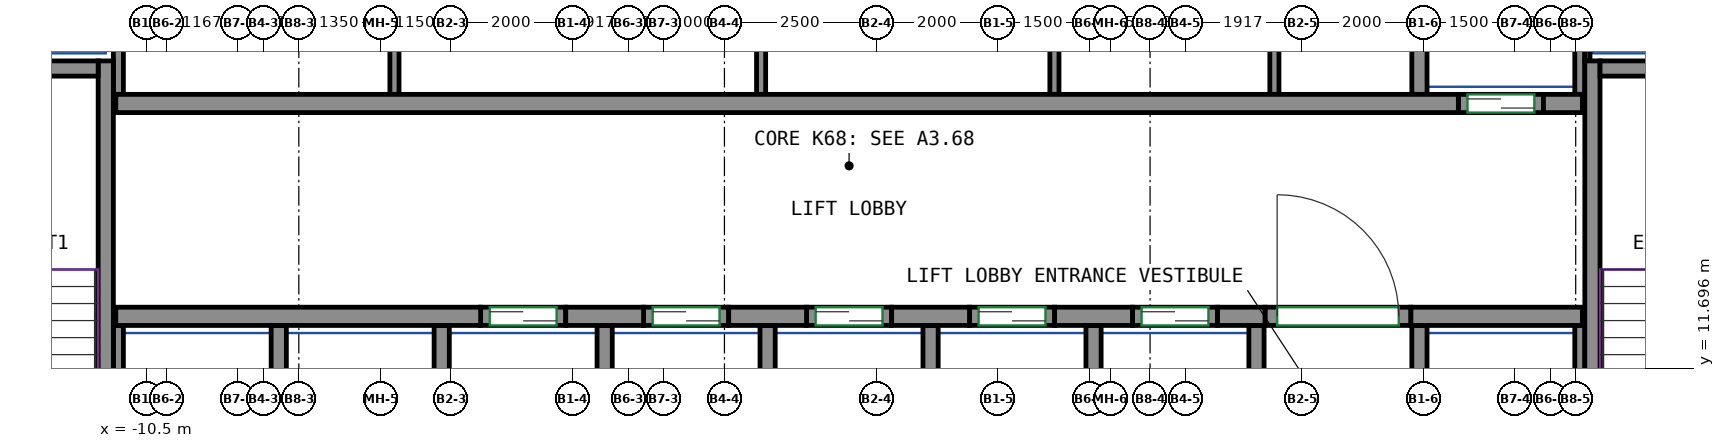
"""IFC4 building model, lengths in metres.
Left out: names, types, materials, properties, quantities, classifications, styles, units other than length and angle.
Written with IfcOpenShell. Run it as: python <this file> out.ifc"""

import sys

from ifc_helpers import new_model, si_unit, direction, frame, frame_2d, origin, place, context, subcontext, project, spatial, rectangle, extrude, source, transform, mapped, element, fill, save


model = new_model("IFC4")
c1 = context("Model", 3, precision=1e-05, world=origin(), true_north=direction((0.0, 1.0)))
c2 = subcontext(c1, "Body", "Model", "MODEL_VIEW")
j1 = project(units=[si_unit("LENGTHUNIT", "METRE"), si_unit("PLANEANGLEUNIT", "RADIAN")], contexts=[c1])
p1 = place(None, origin())
s1 = spatial("IfcSite", under=j1, at=p1, CompositionType="ELEMENT")
p2 = place(p1, origin())
s2 = spatial("IfcBuilding", under=s1, at=p2, CompositionType="ELEMENT")
p3 = place(p2, frame((0.0, 0.0, 273.8)))
s3 = spatial("IfcBuildingStorey", under=s2, at=p3, CompositionType="ELEMENT", Elevation=273.8)
m1 = source(origin(), c2, "Body", "SweptSolid", [
    extrude(rectangle(XDim=7.75, YDim=0.25, at=frame_2d((3.875, 0.0))), origin(), (0.0, 0.0, 1.0), 3.12),
])
p4 = place(p3, frame((-11.175, 9.0, 0.0), z_axis=(0.0, 0.0, 1.0), x_axis=(0.0, 1.0, 0.0)))
e1 = element("IfcWall", 1, at=p4, inside=s3, PredefinedType="SHEAR", context=c2, shape_type="MappedRepresentation", body=[
    mapped(m1, transform((0.0, 0.0, 0.0))),
])
m2 = source(origin(), c2, "Body", "SweptSolid", [
    extrude(rectangle(XDim=3.7, YDim=0.25, at=frame_2d((1.85, 0.0))), origin(), (0.0, 0.0, 1.0), 3.12),
])
p5 = place(p3, frame((-15.0, 16.625, 0.0), z_axis=(0.0, 0.0, 1.0), x_axis=(1.0, 0.0, 0.0)))
e2 = element("IfcWall", 2, at=p5, inside=s3, PredefinedType="SHEAR", context=c2, shape_type="MappedRepresentation", body=[
    mapped(m2, transform((0.0, 0.0, 0.0))),
])
p6 = place(p3, frame((13.275, 9.0, 0.0), z_axis=(0.0, 0.0, 1.0), x_axis=(0.0, 1.0, 0.0)))
e3 = element("IfcWall", 3, at=p6, inside=s3, PredefinedType="SHEAR", context=c2, shape_type="MappedRepresentation", body=[
    mapped(m1, transform((0.0, 0.0, 0.0))),
])
m3 = source(origin(), c2, "Body", "SweptSolid", [
    extrude(rectangle(XDim=3.7, YDim=0.25, at=frame_2d((1.85, 0.0))), origin(), (0.0, 0.0, 1.0), 3.12),
])
p7 = place(p3, frame((13.4, 16.625, 0.0), z_axis=(0.0, 0.0, 1.0), x_axis=(1.0, 0.0, 0.0)))
e4 = element("IfcWall", 4, at=p7, inside=s3, PredefinedType="SHEAR", context=c2, shape_type="MappedRepresentation", body=[
    mapped(m3, transform((0.0, 0.0, 0.0))),
])
m4 = source(origin(), c2, "Body", "SweptSolid", [
    extrude(rectangle(XDim=6.0, YDim=0.3, at=frame_2d((3.0, 0.0))), origin(), (0.0, 0.0, 1.0), 3.12),
])
p8 = place(p3, frame((-11.01, 12.55, 0.0), z_axis=(0.0, 0.0, 1.0), x_axis=(1.0, 0.0, 0.0)))
e5 = element("IfcWall", 5, at=p8, inside=s3, PredefinedType="SHEAR", context=c2, shape_type="MappedRepresentation", body=[
    mapped(m4, transform((0.0, 0.0, 0.0))),
])
m5 = source(origin(), c2, "Body", "SweptSolid", [
    extrude(rectangle(XDim=1.28, YDim=0.3, at=frame_2d((0.64, 0.0))), origin(), (0.0, 0.0, 1.0), 3.12),
])
for number, where, z_axis, x_axis in (
    (6, (-3.61, 12.55, 0.0), (0.0, 0.0, 1.0), (1.0, 0.0, 0.0)),
    (7, (-0.93, 12.55, 0.0), (0.0, 0.0, 1.0), (1.0, 0.0, 0.0)),
    (8, (1.75, 12.55, 0.0), (0.0, 0.0, 1.0), (1.0, 0.0, 0.0)),
    (9, (4.43, 12.55, 0.0), (0.0, 0.0, 1.0), (1.0, 0.0, 0.0)),
):
    element("IfcWall", number, at=place(p3, frame(where, z_axis=z_axis, x_axis=x_axis)), inside=s3, PredefinedType="SHEAR", context=c2, shape_type="MappedRepresentation", body=[
        mapped(m5, transform((0.0, 0.0, 0.0))),
    ])
m6 = source(origin(), c2, "Body", "SweptSolid", [
    extrude(rectangle(XDim=0.78, YDim=0.3, at=frame_2d((0.39, 0.0))), origin(), (0.0, 0.0, 1.0), 3.12),
])
p9 = place(p3, frame((7.11, 12.55, 0.0), z_axis=(0.0, 0.0, 1.0), x_axis=(1.0, 0.0, 0.0)))
e10 = element("IfcWall", 10, at=p9, inside=s3, PredefinedType="SHEAR", context=c2, shape_type="MappedRepresentation", body=[
    mapped(m6, transform((0.0, 0.0, 0.0))),
])
m7 = source(origin(), c2, "Body", "SweptSolid", [
    extrude(rectangle(XDim=2.82, YDim=0.3, at=frame_2d((1.41, 0.0))), origin(), (0.0, 0.0, 1.0), 3.12),
])
p10 = place(p3, frame((10.29, 12.55, 0.0), z_axis=(0.0, 0.0, 1.0), x_axis=(1.0, 0.0, 0.0)))
e11 = element("IfcWall", 11, at=p10, inside=s3, PredefinedType="SHEAR", context=c2, shape_type="MappedRepresentation", body=[
    mapped(m7, transform((0.0, 0.0, 0.0))),
])
m8 = source(origin(), c2, "Body", "SweptSolid", [
    extrude(rectangle(XDim=22.08, YDim=0.3, at=frame_2d((11.04, 0.0))), origin(), (0.0, 0.0, 1.0), 3.12),
])
p11 = place(p3, frame((-11.01, 16.05, 0.0), z_axis=(0.0, 0.0, 1.0), x_axis=(1.0, 0.0, 0.0)))
e12 = element("IfcWall", 12, at=p11, inside=s3, PredefinedType="SHEAR", context=c2, shape_type="MappedRepresentation", body=[
    mapped(m8, transform((0.0, 0.0, 0.0))),
])
m9 = source(origin(), c2, "Body", "SweptSolid", [
    extrude(rectangle(XDim=0.64, YDim=0.3, at=frame_2d((0.32, 0.0))), origin(), (0.0, 0.0, 1.0), 3.12),
])
p12 = place(p3, frame((12.47, 16.05, 0.0), z_axis=(0.0, 0.0, 1.0), x_axis=(1.0, 0.0, 0.0)))
e13 = element("IfcWall", 13, at=p12, inside=s3, PredefinedType="SHEAR", context=c2, shape_type="MappedRepresentation", body=[
    mapped(m9, transform((0.0, 0.0, 0.0))),
])
m10 = source(origin(), c2, "Body", "SweptSolid", [
    extrude(rectangle(XDim=1.4, YDim=0.3, at=frame_2d((0.7, 0.0))), origin(), (0.0, 0.0, 1.0), 3.12),
])
p13 = place(p3, frame((-5.01, 12.55, 0.0), z_axis=(0.0, 0.0, 1.0), x_axis=(1.0, 0.0, 0.0)))
e14 = element("IfcWall", 14, at=p13, inside=s3, PredefinedType="PARTITIONING", context=c2, shape_type="MappedRepresentation", body=[
    mapped(m10, transform((0.0, 0.0, 0.0))),
])
p14 = place(p13, frame((0.15, 0.0, 0.0)))
e15 = element("IfcOpeningElement", 15, at=p14, cuts=e14, PredefinedType="OPENING", context=c2, shape_type="SweptSolid", body=[
    extrude(rectangle(XDim=1.1, YDim=2.1, at=frame_2d((0.55, 1.05))), frame((0.0, 0.16, 0.0), z_axis=(0.0, -1.0, 0.0), x_axis=(1.0, 0.0, 0.0)), (0.0, 0.0, 1.0), 0.32),
])
m11 = source(origin(), c2, "Body", "SweptSolid", [
    extrude(rectangle(XDim=1.4, YDim=0.3, at=frame_2d((0.7, 0.0))), origin(), (0.0, 0.0, 1.0), 3.12),
])
p15 = place(p3, frame((-2.33, 12.55, 0.0), z_axis=(0.0, 0.0, 1.0), x_axis=(1.0, 0.0, 0.0)))
e16 = element("IfcWall", 16, at=p15, inside=s3, PredefinedType="PARTITIONING", context=c2, shape_type="MappedRepresentation", body=[
    mapped(m11, transform((0.0, 0.0, 0.0))),
])
p16 = place(p15, frame((0.15, 0.0, 0.0)))
e17 = element("IfcOpeningElement", 17, at=p16, cuts=e16, PredefinedType="OPENING", context=c2, shape_type="SweptSolid", body=[
    extrude(rectangle(XDim=1.1, YDim=2.1, at=frame_2d((0.55, 1.05))), frame((0.0, 0.16, 0.0), z_axis=(0.0, -1.0, 0.0), x_axis=(1.0, 0.0, 0.0)), (0.0, 0.0, 1.0), 0.32),
])
p17 = place(p3, frame((0.35, 12.55, 0.0), z_axis=(0.0, 0.0, 1.0), x_axis=(1.0, 0.0, 0.0)))
e18 = element("IfcWall", 18, at=p17, inside=s3, PredefinedType="PARTITIONING", context=c2, shape_type="MappedRepresentation", body=[
    mapped(m10, transform((0.0, 0.0, 0.0))),
])
p18 = place(p17, frame((0.15, 0.0, 0.0)))
e19 = element("IfcOpeningElement", 19, at=p18, cuts=e18, PredefinedType="OPENING", context=c2, shape_type="SweptSolid", body=[
    extrude(rectangle(XDim=1.1, YDim=2.1, at=frame_2d((0.55, 1.05))), frame((0.0, 0.16, 0.0), z_axis=(0.0, -1.0, 0.0), x_axis=(1.0, 0.0, 0.0)), (0.0, 0.0, 1.0), 0.32),
])
p19 = place(p3, frame((3.03, 12.55, 0.0), z_axis=(0.0, 0.0, 1.0), x_axis=(1.0, 0.0, 0.0)))
e20 = element("IfcWall", 20, at=p19, inside=s3, PredefinedType="PARTITIONING", context=c2, shape_type="MappedRepresentation", body=[
    mapped(m10, transform((0.0, 0.0, 0.0))),
])
p20 = place(p19, frame((0.15, 0.0, 0.0)))
e21 = element("IfcOpeningElement", 21, at=p20, cuts=e20, PredefinedType="OPENING", context=c2, shape_type="SweptSolid", body=[
    extrude(rectangle(XDim=1.1, YDim=2.1, at=frame_2d((0.55, 1.05))), frame((0.0, 0.16, 0.0), z_axis=(0.0, -1.0, 0.0), x_axis=(1.0, 0.0, 0.0)), (0.0, 0.0, 1.0), 0.32),
])
p21 = place(p3, frame((5.71, 12.55, 0.0), z_axis=(0.0, 0.0, 1.0), x_axis=(1.0, 0.0, 0.0)))
e22 = element("IfcWall", 22, at=p21, inside=s3, PredefinedType="PARTITIONING", context=c2, shape_type="MappedRepresentation", body=[
    mapped(m11, transform((0.0, 0.0, 0.0))),
])
p22 = place(p21, frame((0.15, 0.0, 0.0)))
e23 = element("IfcOpeningElement", 23, at=p22, cuts=e22, PredefinedType="OPENING", context=c2, shape_type="SweptSolid", body=[
    extrude(rectangle(XDim=1.1, YDim=2.1, at=frame_2d((0.55, 1.05))), frame((0.0, 0.16, 0.0), z_axis=(0.0, -1.0, 0.0), x_axis=(1.0, 0.0, 0.0)), (0.0, 0.0, 1.0), 0.32),
])
p23 = place(p3, frame((11.07, 16.05, 0.0), z_axis=(0.0, 0.0, 1.0), x_axis=(1.0, 0.0, 0.0)))
e24 = element("IfcWall", 24, at=p23, inside=s3, PredefinedType="PARTITIONING", context=c2, shape_type="MappedRepresentation", body=[
    mapped(m10, transform((0.0, 0.0, 0.0))),
])
p24 = place(p23, frame((0.15, 0.0, 0.0)))
e25 = element("IfcOpeningElement", 25, at=p24, cuts=e24, PredefinedType="OPENING", context=c2, shape_type="SweptSolid", body=[
    extrude(rectangle(XDim=1.1, YDim=2.1, at=frame_2d((0.55, 1.05))), frame((0.0, 0.16, 0.0), z_axis=(0.0, -1.0, 0.0), x_axis=(1.0, 0.0, 0.0)), (0.0, 0.0, 1.0), 0.32),
])
m12 = source(origin(), c2, "Body", "SweptSolid", [
    extrude(rectangle(XDim=2.4, YDim=0.3, at=frame_2d((1.2, 0.0))), origin(), (0.0, 0.0, 1.0), 3.12),
])
p25 = place(p3, frame((7.89, 12.55, 0.0), z_axis=(0.0, 0.0, 1.0), x_axis=(1.0, 0.0, 0.0)))
e26 = element("IfcWall", 26, at=p25, inside=s3, PredefinedType="PARTITIONING", context=c2, shape_type="MappedRepresentation", body=[
    mapped(m12, transform((0.0, 0.0, 0.0))),
])
p26 = place(p25, frame((0.2, 0.0, 0.0)))
e27 = element("IfcOpeningElement", 27, at=p26, cuts=e26, PredefinedType="OPENING", context=c2, shape_type="SweptSolid", body=[
    extrude(rectangle(XDim=2.0, YDim=2.1, at=frame_2d((1.0, 1.05))), frame((0.0, 0.16, 0.0), z_axis=(0.0, -1.0, 0.0), x_axis=(1.0, 0.0, 0.0)), (0.0, 0.0, 1.0), 0.32),
])
m13 = source(origin(), c2, "Body", "SweptSolid", [
    extrude(rectangle(XDim=3.275, YDim=0.165, at=frame_2d((1.638, 0.0))), origin(), (0.0, 0.0, 1.0), 3.12),
])
p27 = place(p3, frame((13.067, 16.2, 0.0), z_axis=(0.0, 0.0, 1.0), x_axis=(0.0, 1.0, 0.0)))
e28 = element("IfcWall", 28, at=p27, inside=s3, PredefinedType="PARTITIONING", context=c2, shape_type="MappedRepresentation", body=[
    mapped(m13, transform((0.0, 0.0, 0.0))),
])
m14 = source(origin(), c2, "Body", "SweptSolid", [
    extrude(rectangle(XDim=4.8, YDim=0.165, at=frame_2d((2.4, 0.0))), origin(), (0.0, 0.0, 1.0), 3.12),
])
p28 = place(p3, frame((-10.968, 16.2, 0.0), z_axis=(0.0, 0.0, 1.0), x_axis=(0.0, 1.0, 0.0)))
e29 = element("IfcWall", 29, at=p28, inside=s3, PredefinedType="PARTITIONING", context=c2, shape_type="MappedRepresentation", body=[
    mapped(m14, transform((0.0, 0.0, 0.0))),
])
m15 = source(origin(), c2, "Body", "SweptSolid", [
    extrude(rectangle(XDim=3.275, YDim=0.25, at=frame_2d((1.638, 0.0))), origin(), (0.0, 0.0, 1.0), 3.12),
])
p29 = place(p3, frame((10.43, 16.2, 0.0), z_axis=(0.0, 0.0, 1.0), x_axis=(0.0, 1.0, 0.0)))
e30 = element("IfcWall", 30, at=p29, inside=s3, PredefinedType="PARTITIONING", context=c2, shape_type="MappedRepresentation", body=[
    mapped(m15, transform((0.0, 0.0, 0.0))),
])
m16 = source(origin(), c2, "Body", "SweptSolid", [
    extrude(rectangle(XDim=2.725, YDim=0.085, at=frame_2d((1.363, 0.0))), origin(), (0.0, 0.0, 1.0), 3.12),
])
p30 = place(p3, frame((13.192, 16.75, 0.0), z_axis=(0.0, 0.0, 1.0), x_axis=(0.0, 1.0, 0.0)))
e31 = element("IfcWall", 31, at=p30, inside=s3, PredefinedType="PARTITIONING", context=c2, shape_type="MappedRepresentation", body=[
    mapped(m16, transform((0.0, 0.0, 0.0))),
])
m17 = source(origin(), c2, "Body", "SweptSolid", [
    extrude(rectangle(XDim=3.4, YDim=0.25, at=frame_2d((1.7, 0.0))), origin(), (0.0, 0.0, 1.0), 3.12),
])
p31 = place(p3, frame((10.43, 9.0, 0.0), z_axis=(0.0, 0.0, 1.0), x_axis=(0.0, 1.0, 0.0)))
e32 = element("IfcWall", 32, at=p31, inside=s3, PredefinedType="PARTITIONING", context=c2, shape_type="MappedRepresentation", body=[
    mapped(m17, transform((0.0, 0.0, 0.0))),
])
m18 = source(origin(), c2, "Body", "SweptSolid", [
    extrude(rectangle(XDim=3.4, YDim=0.165, at=frame_2d((1.7, 0.0))), origin(), (0.0, 0.0, 1.0), 3.12),
])
p32 = place(p3, frame((13.067, 9.0, 0.0), z_axis=(0.0, 0.0, 1.0), x_axis=(0.0, 1.0, 0.0)))
e33 = element("IfcWall", 33, at=p32, inside=s3, PredefinedType="PARTITIONING", context=c2, shape_type="MappedRepresentation", body=[
    mapped(m18, transform((0.0, 0.0, 0.0))),
])
for number, where, z_axis, x_axis in (
    (34, (2.39, 9.0, 0.0), (0.0, 0.0, 1.0), (0.0, 1.0, 0.0)),
    (35, (5.07, 9.0, 0.0), (0.0, 0.0, 1.0), (0.0, 1.0, 0.0)),
    (36, (7.75, 9.0, 0.0), (0.0, 0.0, 1.0), (0.0, 1.0, 0.0)),
    (37, (-0.29, 9.0, 0.0), (0.0, 0.0, 1.0), (0.0, 1.0, 0.0)),
):
    element("IfcWall", number, at=place(p3, frame(where, z_axis=z_axis, x_axis=x_axis)), inside=s3, PredefinedType="PARTITIONING", context=c2, shape_type="MappedRepresentation", body=[
        mapped(m17, transform((0.0, 0.0, 0.0))),
    ])
p33 = place(p3, frame((-10.968, 9.0, 0.0), z_axis=(0.0, 0.0, 1.0), x_axis=(0.0, 1.0, 0.0)))
e38 = element("IfcWall", 38, at=p33, inside=s3, PredefinedType="PARTITIONING", context=c2, shape_type="MappedRepresentation", body=[
    mapped(m18, transform((0.0, 0.0, 0.0))),
])
for number, where, z_axis, x_axis in (
    (39, (-2.97, 9.0, 0.0), (0.0, 0.0, 1.0), (0.0, 1.0, 0.0)),
    (40, (-5.65, 9.0, 0.0), (0.0, 0.0, 1.0), (0.0, 1.0, 0.0)),
    (41, (-8.33, 9.0, 0.0), (0.0, 0.0, 1.0), (0.0, 1.0, 0.0)),
):
    element("IfcWall", number, at=place(p3, frame(where, z_axis=z_axis, x_axis=x_axis)), inside=s3, PredefinedType="PARTITIONING", context=c2, shape_type="MappedRepresentation", body=[
        mapped(m17, transform((0.0, 0.0, 0.0))),
    ])
m19 = source(origin(), c2, "Body", "SweptSolid", [
    extrude(rectangle(XDim=4.8, YDim=0.15, at=frame_2d((2.4, 0.0))), origin(), (0.0, 0.0, 1.0), 3.12),
])
for number, where, z_axis, x_axis in (
    (42, (-6.427, 16.2, 0.0), (0.0, 0.0, 1.0), (0.0, 1.0, 0.0)),
    (43, (-0.397, 16.2, 0.0), (0.0, 0.0, 1.0), (0.0, 1.0, 0.0)),
    (44, (4.427, 16.2, 0.0), (0.0, 0.0, 1.0), (0.0, 1.0, 0.0)),
    (45, (8.045, 16.2, 0.0), (0.0, 0.0, 1.0), (0.0, 1.0, 0.0)),
):
    element("IfcWall", number, at=place(p3, frame(where, z_axis=z_axis, x_axis=x_axis)), inside=s3, PredefinedType="PARTITIONING", context=c2, shape_type="MappedRepresentation", body=[
        mapped(m19, transform((0.0, 0.0, 0.0))),
    ])
p34 = place(p26, origin())
e46 = element("IfcDoor", 46, at=p34, inside=s3, OperationType="DOUBLE_DOOR_SINGLE_SWING", PredefinedType="DOOR", context=c2, shape_type="SweptSolid", body=[
    extrude(rectangle(XDim=2.0, YDim=2.1, at=frame_2d((1.0, 1.05))), frame((0.0, 0.025, 0.0), z_axis=(0.0, -1.0, 0.0), x_axis=(1.0, 0.0, 0.0)), (0.0, 0.0, 1.0), 0.05),
])
fill(e27, e46)
p35 = place(p14, origin())
e47 = element("IfcDoor", 47, at=p35, inside=s3, OperationType="DOUBLE_DOOR_SLIDING", PredefinedType="DOOR", context=c2, shape_type="SweptSolid", body=[
    extrude(rectangle(XDim=1.1, YDim=2.1, at=frame_2d((0.55, 1.05))), frame((0.0, 0.025, 0.0), z_axis=(0.0, -1.0, 0.0), x_axis=(1.0, 0.0, 0.0)), (0.0, 0.0, 1.0), 0.05),
])
fill(e15, e47)
p36 = place(p16, origin())
e48 = element("IfcDoor", 48, at=p36, inside=s3, OperationType="DOUBLE_DOOR_SLIDING", PredefinedType="DOOR", context=c2, shape_type="SweptSolid", body=[
    extrude(rectangle(XDim=1.1, YDim=2.1, at=frame_2d((0.55, 1.05))), frame((0.0, 0.025, 0.0), z_axis=(0.0, -1.0, 0.0), x_axis=(1.0, 0.0, 0.0)), (0.0, 0.0, 1.0), 0.05),
])
fill(e17, e48)
p37 = place(p18, origin())
e49 = element("IfcDoor", 49, at=p37, inside=s3, OperationType="DOUBLE_DOOR_SLIDING", PredefinedType="DOOR", context=c2, shape_type="SweptSolid", body=[
    extrude(rectangle(XDim=1.1, YDim=2.1, at=frame_2d((0.55, 1.05))), frame((0.0, 0.025, 0.0), z_axis=(0.0, -1.0, 0.0), x_axis=(1.0, 0.0, 0.0)), (0.0, 0.0, 1.0), 0.05),
])
fill(e19, e49)
p38 = place(p20, origin())
e50 = element("IfcDoor", 50, at=p38, inside=s3, OperationType="DOUBLE_DOOR_SLIDING", PredefinedType="DOOR", context=c2, shape_type="SweptSolid", body=[
    extrude(rectangle(XDim=1.1, YDim=2.1, at=frame_2d((0.55, 1.05))), frame((0.0, 0.025, 0.0), z_axis=(0.0, -1.0, 0.0), x_axis=(1.0, 0.0, 0.0)), (0.0, 0.0, 1.0), 0.05),
])
fill(e21, e50)
p39 = place(p22, origin())
e51 = element("IfcDoor", 51, at=p39, inside=s3, OperationType="DOUBLE_DOOR_SLIDING", PredefinedType="DOOR", context=c2, shape_type="SweptSolid", body=[
    extrude(rectangle(XDim=1.1, YDim=2.1, at=frame_2d((0.55, 1.05))), frame((0.0, 0.025, 0.0), z_axis=(0.0, -1.0, 0.0), x_axis=(1.0, 0.0, 0.0)), (0.0, 0.0, 1.0), 0.05),
])
fill(e23, e51)
p40 = place(p24, origin())
e52 = element("IfcDoor", 52, at=p40, inside=s3, OperationType="DOUBLE_DOOR_SLIDING", PredefinedType="DOOR", context=c2, shape_type="SweptSolid", body=[
    extrude(rectangle(XDim=1.1, YDim=2.1, at=frame_2d((0.55, 1.05))), frame((0.0, 0.025, 0.0), z_axis=(0.0, -1.0, 0.0), x_axis=(1.0, 0.0, 0.0)), (0.0, 0.0, 1.0), 0.05),
])
fill(e25, e52)
save(model, sys.argv[1])
